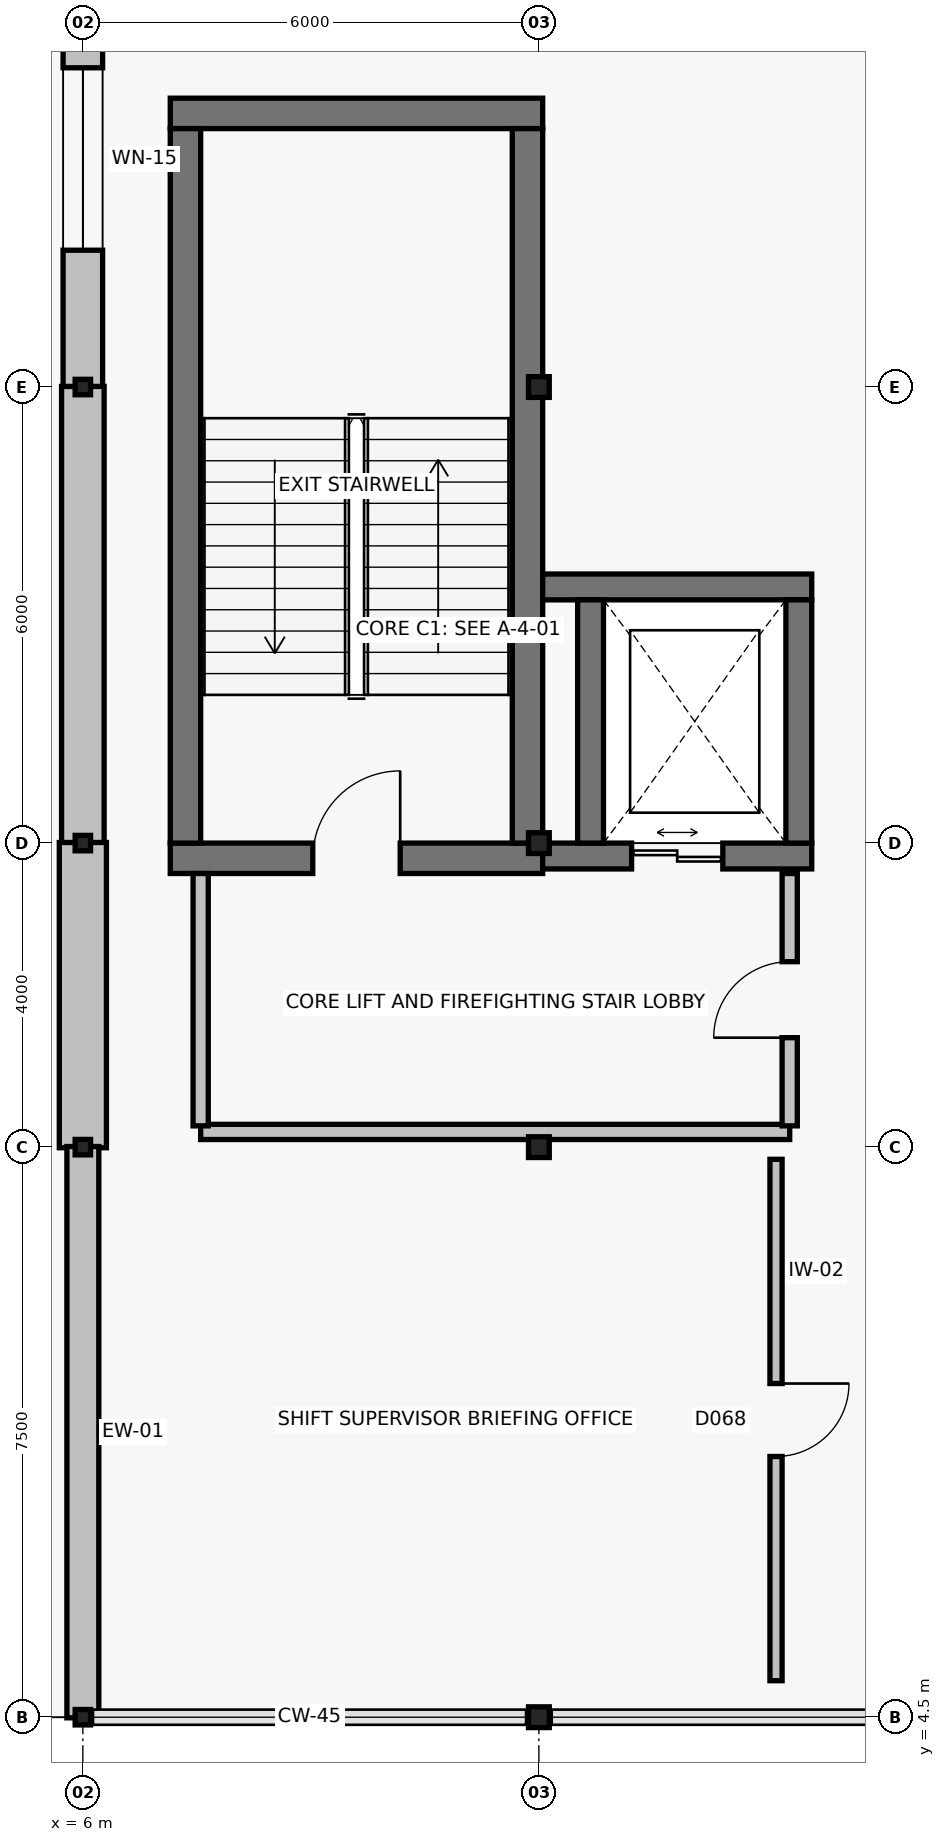
"""IFC4 building model, lengths in metres.
Left out: names, types, materials, properties, quantities, classifications, styles, units other than length and angle.
Written with IfcOpenShell. Run it as: python <this file> out.ifc"""

import sys

from ifc_helpers import new_model, si_unit, direction, frame, frame_2d, origin, origin_2d, place, context, subcontext, project, spatial, rectangle, hollow_rectangle, hollow_circle, extrude, element, fill, save


model = new_model("IFC4")
c1 = context("Model", 3, precision=1e-05, world=origin(), true_north=direction((0.0, 1.0)))
c2 = subcontext(c1, "Body", "Model", "MODEL_VIEW")
j1 = project(units=[si_unit("LENGTHUNIT", "METRE"), si_unit("PLANEANGLEUNIT", "RADIAN")], contexts=[c1])
p1 = place(None, origin())
s1 = spatial("IfcSite", under=j1, at=p1, CompositionType="ELEMENT")
p2 = place(p1, origin())
s2 = spatial("IfcBuilding", under=s1, at=p2, CompositionType="ELEMENT")
p3 = place(p2, frame((0.0, 0.0, 23.6)))
s3 = spatial("IfcBuildingStorey", under=s2, at=p3, CompositionType="ELEMENT", Elevation=23.6)
for number, where, z_axis, x_axis in (
    (1, (6.0, 4.5, 0.0), (0.0, 0.0, 1.0), (1.0, 0.0, 0.0)),
    (2, (6.0, 12.0, 0.0), (0.0, 0.0, 1.0), (1.0, 0.0, 0.0)),
    (3, (6.0, 16.0, 0.0), (0.0, 0.0, 1.0), (1.0, 0.0, 0.0)),
    (4, (6.0, 22.0, 0.0), (0.0, 0.0, 1.0), (1.0, 0.0, 0.0)),
):
    element("IfcColumn", number, at=place(p3, frame(where, z_axis=z_axis, x_axis=x_axis)), inside=s3, PredefinedType="COLUMN", context=c2, shape_type="SweptSolid", body=[
        extrude(hollow_rectangle(XDim=0.203, YDim=0.203, WallThickness=0.01, InnerFilletRadius=0.01, OuterFilletRadius=0.019, at=origin_2d()), origin(), (0.0, 0.0, 1.0), 5.0),
    ])
for number, where, z_axis, x_axis in (
    (5, (12.0, 4.5, 0.0), (0.0, 0.0, 1.0), (1.0, 0.0, 0.0)),
    (6, (12.0, 12.0, 0.0), (0.0, 0.0, 1.0), (1.0, 0.0, 0.0)),
    (7, (12.0, 16.0, 0.0), (0.0, 0.0, 1.0), (1.0, 0.0, 0.0)),
    (8, (12.0, 22.0, 0.0), (0.0, 0.0, 1.0), (1.0, 0.0, 0.0)),
):
    element("IfcColumn", number, at=place(p3, frame(where, z_axis=z_axis, x_axis=x_axis)), inside=s3, PredefinedType="COLUMN", context=c2, shape_type="SweptSolid", body=[
        extrude(hollow_circle(Radius=0.136, WallThickness=0.01, at=origin_2d()), origin(), (0.0, 0.0, 1.0), 5.0),
    ])
p4 = place(p3, frame((6.0, 28.008, 0.0), z_axis=(0.0, 0.0, 1.0), x_axis=(0.0, -1.0, 0.0)))
e9 = element("IfcWall", 9, at=p4, inside=s3, PredefinedType="SOLIDWALL", context=c2, shape_type="SweptSolid", body=[
    extrude(rectangle(XDim=6.016, YDim=0.52, at=frame_2d((3.008, 0.0))), origin(), (0.0, 0.0, 1.0), 4.181),
])
p5 = place(p4, frame((1.808, 0.0, 0.9)))
e10 = element("IfcOpeningElement", 10, at=p5, cuts=e9, PredefinedType="OPENING", context=c2, shape_type="SweptSolid", body=[
    extrude(rectangle(XDim=2.4, YDim=2.1, at=frame_2d((1.2, 1.05))), frame((0.0, 0.275, 0.0), z_axis=(0.0, -1.0, 0.0), x_axis=(1.0, 0.0, 0.0)), (0.0, 0.0, 1.0), 0.55),
])
p6 = place(p3, frame((6.0, 22.008, 0.0), z_axis=(0.0, 0.0, 1.0), x_axis=(0.0, -1.0, 0.0)))
e11 = element("IfcWall", 11, at=p6, inside=s3, PredefinedType="SOLIDWALL", context=c2, shape_type="SweptSolid", body=[
    extrude(rectangle(XDim=6.016, YDim=0.56, at=frame_2d((3.008, 0.0))), origin(), (0.0, 0.0, 1.0), 4.181),
])
p7 = place(p3, frame((6.0, 16.008, 0.0), z_axis=(0.0, 0.0, 1.0), x_axis=(0.0, -1.0, 0.0)))
e12 = element("IfcWall", 12, at=p7, inside=s3, PredefinedType="SOLIDWALL", context=c2, shape_type="SweptSolid", body=[
    extrude(rectangle(XDim=4.016, YDim=0.62, at=frame_2d((2.008, 0.0))), origin(), (0.0, 0.0, 1.0), 4.257),
])
p8 = place(p3, frame((6.0, 12.008, 0.0), z_axis=(0.0, 0.0, 1.0), x_axis=(0.0, -1.0, 0.0)))
e13 = element("IfcWall", 13, at=p8, inside=s3, PredefinedType="SOLIDWALL", context=c2, shape_type="SweptSolid", body=[
    extrude(rectangle(XDim=7.516, YDim=0.42, at=frame_2d((3.758, 0.0))), origin(), (0.0, 0.0, 1.0), 4.257),
])
p9 = place(p3, frame((7.15, 15.8, 0.0), z_axis=(0.0, 0.0, 1.0), x_axis=(1.0, 0.0, 0.0)))
e14 = element("IfcWall", 14, at=p9, inside=s3, PredefinedType="SHEAR", context=c2, shape_type="SweptSolid", body=[
    extrude(rectangle(XDim=4.9, YDim=0.4, at=frame_2d((2.45, 0.0))), origin(), (0.0, 0.0, 1.0), 4.75),
])
p10 = place(p9, frame((1.875, 0.0, 0.0)))
e15 = element("IfcOpeningElement", 15, at=p10, cuts=e14, PredefinedType="OPENING", context=c2, shape_type="SweptSolid", body=[
    extrude(rectangle(XDim=1.15, YDim=2.15, at=frame_2d((0.575, 1.075))), frame((0.0, 0.215, 0.0), z_axis=(0.0, -1.0, 0.0), x_axis=(1.0, 0.0, 0.0)), (0.0, 0.0, 1.0), 0.43),
])
p11 = place(p3, frame((12.05, 25.6, 0.0), z_axis=(0.0, 0.0, 1.0), x_axis=(-1.0, 0.0, 0.0)))
e16 = element("IfcWall", 16, at=p11, inside=s3, PredefinedType="SHEAR", context=c2, shape_type="SweptSolid", body=[
    extrude(rectangle(XDim=4.9, YDim=0.4, at=frame_2d((2.45, 0.0))), origin(), (0.0, 0.0, 1.0), 4.75),
])
for number, where, z_axis, x_axis in (
    (17, (7.35, 25.4, 0.0), (0.0, 0.0, 1.0), (0.0, -1.0, 0.0)),
    (18, (11.85, 16.0, 0.0), (0.0, 0.0, 1.0), (0.0, 1.0, 0.0)),
):
    element("IfcWall", number, at=place(p3, frame(where, z_axis=z_axis, x_axis=x_axis)), inside=s3, PredefinedType="SHEAR", context=c2, shape_type="SweptSolid", body=[
        extrude(rectangle(XDim=9.4, YDim=0.4, at=frame_2d((4.7, 0.0))), origin(), (0.0, 0.0, 1.0), 4.75),
    ])
p12 = place(p3, frame((12.05, 15.83, 0.0), z_axis=(0.0, 0.0, 1.0), x_axis=(1.0, 0.0, 0.0)))
e19 = element("IfcWall", 19, at=p12, inside=s3, PredefinedType="SHEAR", context=c2, shape_type="SweptSolid", body=[
    extrude(rectangle(XDim=3.54, YDim=0.34, at=frame_2d((1.77, 0.0))), origin(), (0.0, 0.0, 1.0), 4.75),
])
p13 = place(p12, frame((1.17, 0.0, 0.0)))
e20 = element("IfcOpeningElement", 20, at=p13, cuts=e19, PredefinedType="OPENING", context=c2, shape_type="SweptSolid", body=[
    extrude(rectangle(XDim=1.2, YDim=2.2, at=frame_2d((0.6, 1.1))), frame((0.0, 0.185, 0.0), z_axis=(0.0, -1.0, 0.0), x_axis=(1.0, 0.0, 0.0)), (0.0, 0.0, 1.0), 0.37),
])
p14 = place(p3, frame((15.59, 19.37, 0.0), z_axis=(0.0, 0.0, 1.0), x_axis=(-1.0, 0.0, 0.0)))
e21 = element("IfcWall", 21, at=p14, inside=s3, PredefinedType="SHEAR", context=c2, shape_type="SweptSolid", body=[
    extrude(rectangle(XDim=3.54, YDim=0.34, at=frame_2d((1.77, 0.0))), origin(), (0.0, 0.0, 1.0), 4.75),
])
for number, where, z_axis, x_axis in (
    (22, (12.68, 19.2, 0.0), (0.0, 0.0, 1.0), (0.0, -1.0, 0.0)),
    (23, (15.42, 16.0, 0.0), (0.0, 0.0, 1.0), (0.0, 1.0, 0.0)),
):
    element("IfcWall", number, at=place(p3, frame(where, z_axis=z_axis, x_axis=x_axis)), inside=s3, PredefinedType="SHEAR", context=c2, shape_type="SweptSolid", body=[
        extrude(rectangle(XDim=3.2, YDim=0.34, at=frame_2d((1.6, 0.0))), origin(), (0.0, 0.0, 1.0), 4.75),
    ])
p15 = place(p3, frame((7.55, 12.2, 0.0), z_axis=(0.0, 0.0, 1.0), x_axis=(1.0, 0.0, 0.0)))
e24 = element("IfcWall", 24, at=p15, inside=s3, PredefinedType="PARTITIONING", context=c2, shape_type="SweptSolid", body=[
    extrude(rectangle(XDim=7.75, YDim=0.2, at=frame_2d((3.875, 0.0))), origin(), (0.0, 0.0, 1.0), 4.181),
])
p16 = place(p3, frame((7.55, 15.6, 0.0), z_axis=(0.0, 0.0, 1.0), x_axis=(0.0, -1.0, 0.0)))
e25 = element("IfcWall", 25, at=p16, inside=s3, PredefinedType="PARTITIONING", context=c2, shape_type="SweptSolid", body=[
    extrude(rectangle(XDim=3.32, YDim=0.2, at=frame_2d((1.66, 0.0))), origin(), (0.0, 0.0, 1.0), 4.257),
])
p17 = place(p3, frame((15.3, 12.28, 0.0), z_axis=(0.0, 0.0, 1.0), x_axis=(0.0, 1.0, 0.0)))
e26 = element("IfcWall", 26, at=p17, inside=s3, PredefinedType="PARTITIONING", context=c2, shape_type="SweptSolid", body=[
    extrude(rectangle(XDim=3.32, YDim=0.2, at=frame_2d((1.66, 0.0))), origin(), (0.0, 0.0, 1.0), 4.31),
])
p18 = place(p17, frame((1.16, 0.0, 0.0)))
e27 = element("IfcOpeningElement", 27, at=p18, cuts=e26, PredefinedType="OPENING", context=c2, shape_type="SweptSolid", body=[
    extrude(rectangle(XDim=1.0, YDim=2.15, at=frame_2d((0.5, 1.075))), frame((0.0, 0.115, 0.0), z_axis=(0.0, -1.0, 0.0), x_axis=(1.0, 0.0, 0.0)), (0.0, 0.0, 1.0), 0.23),
])
p19 = place(p3, frame((15.12, 11.84, 0.0), z_axis=(0.0, 0.0, 1.0), x_axis=(0.0, -1.0, 0.0)))
e28 = element("IfcWall", 28, at=p19, inside=s3, PredefinedType="PARTITIONING", context=c2, shape_type="SweptSolid", body=[
    extrude(rectangle(XDim=6.86, YDim=0.16, at=frame_2d((3.43, 0.0))), origin(), (0.0, 0.0, 1.0), 4.31),
])
p20 = place(p19, frame((2.95, 0.0, 0.0)))
e29 = element("IfcOpeningElement", 29, at=p20, cuts=e28, PredefinedType="OPENING", context=c2, shape_type="SweptSolid", body=[
    extrude(rectangle(XDim=0.96, YDim=2.1, at=frame_2d((0.48, 1.05))), frame((0.0, 0.095, 0.0), z_axis=(0.0, -1.0, 0.0), x_axis=(1.0, 0.0, 0.0)), (0.0, 0.0, 1.0), 0.19),
])
p21 = place(p5, origin())
e30 = element("IfcWindow", 30, at=p21, inside=s3, PartitioningType="SINGLE_PANEL", PredefinedType="WINDOW", context=c2, shape_type="SweptSolid", body=[
    extrude(rectangle(XDim=2.4, YDim=2.1, at=frame_2d((1.2, 1.05))), frame((0.0, 0.03, 0.0), z_axis=(0.0, -1.0, 0.0), x_axis=(1.0, 0.0, 0.0)), (0.0, 0.0, 1.0), 0.06),
])
fill(e10, e30)
p22 = place(p10, origin())
e31 = element("IfcDoor", 31, at=p22, inside=s3, OperationType="SINGLE_SWING_RIGHT", PredefinedType="DOOR", context=c2, shape_type="SweptSolid", body=[
    extrude(rectangle(XDim=1.15, YDim=2.15, at=frame_2d((0.575, 1.075))), frame((0.0, 0.025, 0.0), z_axis=(0.0, -1.0, 0.0), x_axis=(1.0, 0.0, 0.0)), (0.0, 0.0, 1.0), 0.05),
])
fill(e15, e31)
p23 = place(p13, origin())
e32 = element("IfcDoor", 32, at=p23, inside=s3, OperationType="DOUBLE_DOOR_SLIDING", PredefinedType="DOOR", context=c2, shape_type="SweptSolid", body=[
    extrude(rectangle(XDim=1.2, YDim=2.2, at=frame_2d((0.6, 1.1))), frame((0.0, 0.025, 0.0), z_axis=(0.0, -1.0, 0.0), x_axis=(1.0, 0.0, 0.0)), (0.0, 0.0, 1.0), 0.05),
])
fill(e20, e32)
p24 = place(p18, origin())
e33 = element("IfcDoor", 33, at=p24, inside=s3, OperationType="SINGLE_SWING_LEFT", PredefinedType="DOOR", context=c2, shape_type="SweptSolid", body=[
    extrude(rectangle(XDim=1.0, YDim=2.15, at=frame_2d((0.5, 1.075))), frame((0.0, 0.025, 0.0), z_axis=(0.0, -1.0, 0.0), x_axis=(1.0, 0.0, 0.0)), (0.0, 0.0, 1.0), 0.05),
])
fill(e27, e33)
p25 = place(p20, origin())
e34 = element("IfcDoor", 34, at=p25, inside=s3, OperationType="SINGLE_SWING_LEFT", PredefinedType="DOOR", context=c2, shape_type="SweptSolid", body=[
    extrude(rectangle(XDim=0.96, YDim=2.1, at=frame_2d((0.48, 1.05))), frame((0.0, 0.025, 0.0), z_axis=(0.0, -1.0, 0.0), x_axis=(1.0, 0.0, 0.0)), (0.0, 0.0, 1.0), 0.05),
])
fill(e29, e34)
save(model, sys.argv[1])
